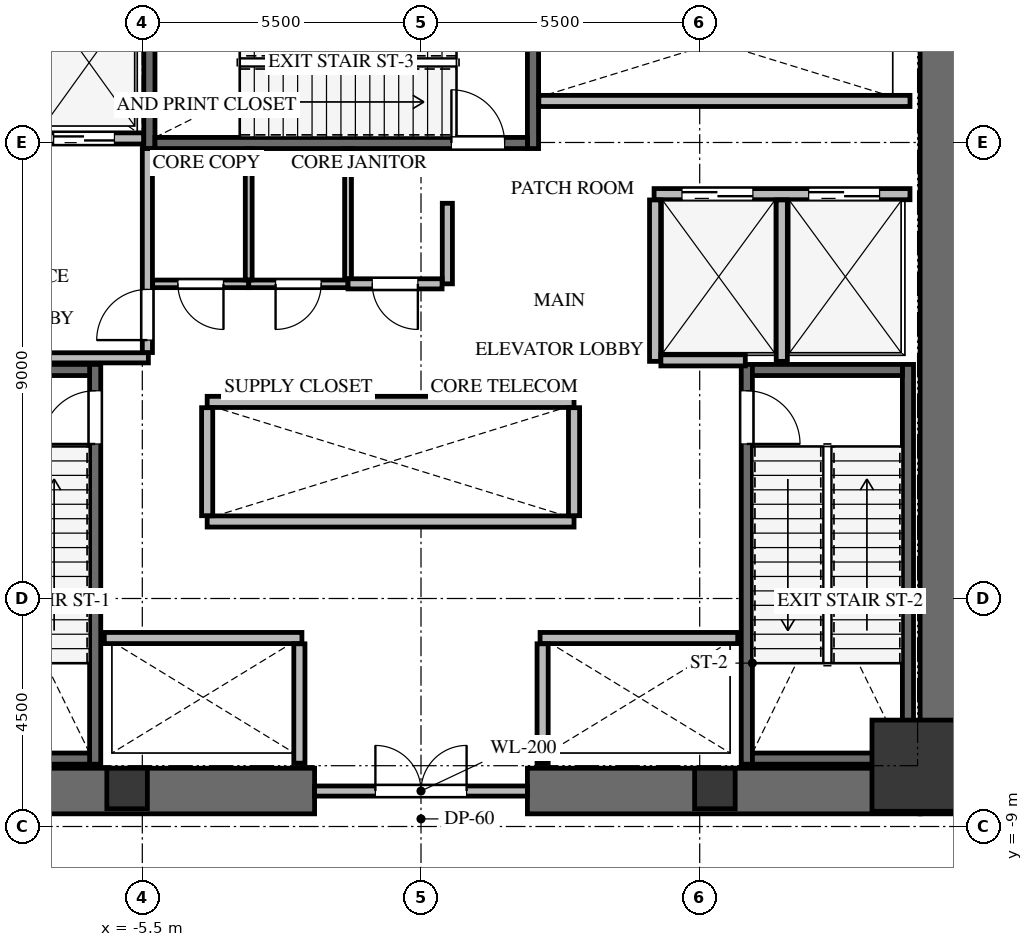
"""IFC4 building model, lengths in metres.
Left out: names, types, materials, properties, quantities, classifications, styles, units other than length and angle.
Written with IfcOpenShell. Run it as: python <this file> out.ifc"""

import sys

from ifc_helpers import new_model, si_unit, direction, frame, frame_2d, origin, origin_2d, place, context, subcontext, project, spatial, rectangle, extrude, source, transform, mapped, element, fill, save


model = new_model("IFC4")
c1 = context("Model", 3, precision=1e-05, world=origin(), true_north=direction((0.0, 1.0)))
c2 = subcontext(c1, "Body", "Model", "MODEL_VIEW")
j1 = project(units=[si_unit("LENGTHUNIT", "METRE"), si_unit("PLANEANGLEUNIT", "RADIAN")], contexts=[c1])
p1 = place(None, origin())
s1 = spatial("IfcSite", under=j1, at=p1, CompositionType="ELEMENT")
p2 = place(p1, origin())
s2 = spatial("IfcBuilding", under=s1, at=p2, CompositionType="ELEMENT")
p3 = place(p2, frame((0.0, 0.0, 21.2)))
s3 = spatial("IfcBuildingStorey", under=s2, at=p3, CompositionType="ELEMENT", Elevation=21.2)
p4 = place(p3, frame((10.3, -8.75, 0.0), z_axis=(0.0, 0.0, 1.0), x_axis=(0.0, 1.0, 0.0)))
e1 = element("IfcWall", 1, at=p4, inside=s3, PredefinedType="SHEAR", context=c2, shape_type="SweptSolid", body=[
    extrude(rectangle(XDim=17.5, YDim=0.9, at=frame_2d((8.75, 0.0))), origin(), (0.0, 0.0, 1.0), 5.6),
])
for number, where, z_axis, x_axis in (
    (2, (-9.85, -8.3, 0.0), (0.0, 0.0, 1.0), (1.0, 0.0, 0.0)),
    (3, (2.1, -8.3, 0.0), (0.0, 0.0, 1.0), (1.0, 0.0, 0.0)),
):
    element("IfcWall", number, at=place(p3, frame(where, z_axis=z_axis, x_axis=x_axis)), inside=s3, PredefinedType="SHEAR", context=c2, shape_type="SweptSolid", body=[
        extrude(rectangle(XDim=7.75, YDim=0.9, at=frame_2d((3.875, 0.0))), origin(), (0.0, 0.0, 1.0), 5.6),
    ])
p5 = place(p3, frame((-6.43, -7.77, -0.32), z_axis=(0.0, 0.0, 1.0), x_axis=(0.0, 1.0, 0.0)))
e4 = element("IfcWall", 4, at=p5, inside=s3, PredefinedType="SHEAR", context=c2, shape_type="SweptSolid", body=[
    extrude(rectangle(XDim=7.89, YDim=0.22, at=frame_2d((3.945, 0.0))), origin(), (0.0, 0.0, 1.0), 5.6),
])
p6 = place(p5, frame((6.32, 0.0, 0.0)))
e5 = element("IfcOpeningElement", 5, at=p6, cuts=e4, PredefinedType="OPENING", context=c2, shape_type="SweptSolid", body=[
    extrude(rectangle(XDim=1.05, YDim=2.15, at=frame_2d((0.525, 1.075))), frame((0.0, 0.12, 0.0), z_axis=(0.0, -1.0, 0.0), x_axis=(1.0, 0.0, 0.0)), (0.0, 0.0, 1.0), 0.24),
])
for number, where, z_axis, x_axis in (
    (6, (-9.5, -7.66, -0.32), (0.0, 0.0, 1.0), (1.0, 0.0, 0.0)),
    (7, (-6.54, 0.01, -0.32), (0.0, 0.0, 1.0), (-1.0, 0.0, 0.0)),
):
    element("IfcWall", number, at=place(p3, frame(where, z_axis=z_axis, x_axis=x_axis)), inside=s3, PredefinedType="SHEAR", context=c2, shape_type="SweptSolid", body=[
        extrude(rectangle(XDim=2.96, YDim=0.22, at=frame_2d((1.48, 0.0))), origin(), (0.0, 0.0, 1.0), 5.6),
    ])
p7 = place(p3, frame((9.61, -7.77, -0.32), z_axis=(0.0, 0.0, 1.0), x_axis=(0.0, 1.0, 0.0)))
e8 = element("IfcWall", 8, at=p7, inside=s3, PredefinedType="SHEAR", context=c2, shape_type="SweptSolid", body=[
    extrude(rectangle(XDim=7.89, YDim=0.22, at=frame_2d((3.945, 0.0))), origin(), (0.0, 0.0, 1.0), 5.6),
])
p8 = place(p3, frame((6.43, 0.12, -0.32), z_axis=(0.0, 0.0, 1.0), x_axis=(0.0, -1.0, 0.0)))
e9 = element("IfcWall", 9, at=p8, inside=s3, PredefinedType="SHEAR", context=c2, shape_type="SweptSolid", body=[
    extrude(rectangle(XDim=7.89, YDim=0.22, at=frame_2d((3.945, 0.0))), origin(), (0.0, 0.0, 1.0), 5.6),
])
p9 = place(p8, frame((0.52, 0.0, 0.0)))
e10 = element("IfcOpeningElement", 10, at=p9, cuts=e9, PredefinedType="OPENING", context=c2, shape_type="SweptSolid", body=[
    extrude(rectangle(XDim=1.05, YDim=2.15, at=frame_2d((0.525, 1.075))), frame((0.0, 0.12, 0.0), z_axis=(0.0, -1.0, 0.0), x_axis=(1.0, 0.0, 0.0)), (0.0, 0.0, 1.0), 0.24),
])
for number, where, z_axis, x_axis in (
    (11, (6.54, -7.66, -0.32), (0.0, 0.0, 1.0), (1.0, 0.0, 0.0)),
    (12, (9.5, 0.01, -0.32), (0.0, 0.0, 1.0), (-1.0, 0.0, 0.0)),
):
    element("IfcWall", number, at=place(p3, frame(where, z_axis=z_axis, x_axis=x_axis)), inside=s3, PredefinedType="SHEAR", context=c2, shape_type="SweptSolid", body=[
        extrude(rectangle(XDim=2.96, YDim=0.22, at=frame_2d((1.48, 0.0))), origin(), (0.0, 0.0, 1.0), 5.6),
    ])
for number, where, z_axis, x_axis in (
    (13, (2.21, 4.38, -0.32), (0.0, 0.0, 1.0), (0.0, 1.0, 0.0)),
    (14, (-5.36, 7.78, -0.32), (0.0, 0.0, 1.0), (0.0, -1.0, 0.0)),
):
    element("IfcWall", number, at=place(p3, frame(where, z_axis=z_axis, x_axis=x_axis)), inside=s3, PredefinedType="SHEAR", context=c2, shape_type="SweptSolid", body=[
        extrude(rectangle(XDim=3.4, YDim=0.22, at=frame_2d((1.7, 0.0))), origin(), (0.0, 0.0, 1.0), 5.6),
    ])
p10 = place(p3, frame((-5.25, 4.49, -0.32), z_axis=(0.0, 0.0, 1.0), x_axis=(1.0, 0.0, 0.0)))
e15 = element("IfcWall", 15, at=p10, inside=s3, PredefinedType="SHEAR", context=c2, shape_type="SweptSolid", body=[
    extrude(rectangle(XDim=7.35, YDim=0.22, at=frame_2d((3.675, 0.0))), origin(), (0.0, 0.0, 1.0), 5.6),
])
p11 = place(p10, frame((5.85, 0.0, 0.0)))
e16 = element("IfcOpeningElement", 16, at=p11, cuts=e15, PredefinedType="OPENING", context=c2, shape_type="SweptSolid", body=[
    extrude(rectangle(XDim=1.05, YDim=2.15, at=frame_2d((0.525, 1.075))), frame((0.0, 0.12, 0.0), z_axis=(0.0, -1.0, 0.0), x_axis=(1.0, 0.0, 0.0)), (0.0, 0.0, 1.0), 0.24),
])
m1 = source(origin(), c2, "Body", "SweptSolid", [
    extrude(rectangle(XDim=1.8, YDim=1.8, at=origin_2d()), origin(), (0.0, 0.0, 1.0), 5.6),
])
p12 = place(p3, frame((9.8, -7.8, -0.32), z_axis=(0.0, 0.0, 1.0), x_axis=(1.0, 0.0, 0.0)))
e17 = element("IfcColumn", 17, at=p12, inside=s3, PredefinedType="COLUMN", context=c2, shape_type="MappedRepresentation", body=[
    mapped(m1, transform((0.0, 0.0, 0.0), x_axis=(1.0, 0.0, 0.0), y_axis=(0.0, 1.0, 0.0), z_axis=(0.0, 0.0, 1.0), scale=1.0)),
])
m2 = source(origin(), c2, "Body", "SweptSolid", [
    extrude(rectangle(XDim=0.8, YDim=0.8, at=origin_2d()), origin(), (0.0, 0.0, 1.0), 5.6),
])
for number, where, z_axis, x_axis in (
    (18, (-5.8, -8.25, -0.32), (0.0, 0.0, 1.0), (1.0, 0.0, 0.0)),
    (19, (5.8, -8.25, -0.32), (0.0, 0.0, 1.0), (1.0, 0.0, 0.0)),
):
    element("IfcColumn", number, at=place(p3, frame(where, z_axis=z_axis, x_axis=x_axis)), inside=s3, PredefinedType="PILASTER", context=c2, shape_type="MappedRepresentation", body=[
        mapped(m2, transform((0.0, 0.0, 0.0), x_axis=(1.0, 0.0, 0.0), y_axis=(0.0, 1.0, 0.0), z_axis=(0.0, 0.0, 1.0), scale=1.0)),
    ])
p13 = place(p3, frame((-2.1, -8.3, 0.0), z_axis=(0.0, 0.0, 1.0), x_axis=(1.0, 0.0, 0.0)))
e20 = element("IfcWall", 20, at=p13, inside=s3, PredefinedType="SOLIDWALL", context=c2, shape_type="SweptSolid", body=[
    extrude(rectangle(XDim=4.2, YDim=0.2, at=frame_2d((2.1, 0.0))), origin(), (0.0, 0.0, 1.0), 5.265),
])
p14 = place(p13, frame((1.2, 0.0, 0.0)))
e21 = element("IfcOpeningElement", 21, at=p14, cuts=e20, PredefinedType="OPENING", context=c2, shape_type="SweptSolid", body=[
    extrude(rectangle(XDim=1.8, YDim=2.15, at=frame_2d((0.9, 1.075))), frame((0.0, 0.11, 0.0), z_axis=(0.0, -1.0, 0.0), x_axis=(1.0, 0.0, 0.0)), (0.0, 0.0, 1.0), 0.22),
])
p15 = place(p3, frame((-9.65, 4.58, 0.0), z_axis=(0.0, 0.0, 1.0), x_axis=(1.0, 0.0, 0.0)))
e22 = element("IfcWall", 22, at=p15, inside=s3, PredefinedType="SOLIDWALL", context=c2, shape_type="SweptSolid", body=[
    extrude(rectangle(XDim=4.175, YDim=0.22, at=frame_2d((2.087, 0.0))), origin(), (0.0, 0.0, 1.0), 5.265),
])
p16 = place(p15, frame((0.4, 0.0, 0.0)))
e23 = element("IfcOpeningElement", 23, at=p16, cuts=e22, PredefinedType="OPENING", context=c2, shape_type="SweptSolid", body=[
    extrude(rectangle(XDim=1.2, YDim=2.15, at=frame_2d((0.6, 1.075))), frame((0.0, 0.12, 0.0), z_axis=(0.0, -1.0, 0.0), x_axis=(1.0, 0.0, 0.0)), (0.0, 0.0, 1.0), 0.24),
])
p17 = place(p15, frame((2.4, 0.0, 0.0)))
e24 = element("IfcOpeningElement", 24, at=p17, cuts=e22, PredefinedType="OPENING", context=c2, shape_type="SweptSolid", body=[
    extrude(rectangle(XDim=1.2, YDim=2.15, at=frame_2d((0.6, 1.075))), frame((0.0, 0.12, 0.0), z_axis=(0.0, -1.0, 0.0), x_axis=(1.0, 0.0, 0.0)), (0.0, 0.0, 1.0), 0.24),
])
p18 = place(p3, frame((-9.65, 0.25, 0.0), z_axis=(0.0, 0.0, 1.0), x_axis=(1.0, 0.0, 0.0)))
e25 = element("IfcWall", 25, at=p18, inside=s3, PredefinedType="SOLIDWALL", context=c2, shape_type="SweptSolid", body=[
    extrude(rectangle(XDim=4.27, YDim=0.2, at=frame_2d((2.135, 0.0))), origin(), (0.0, 0.0, 1.0), 5.265),
])
p19 = place(p3, frame((-5.4, 0.354, 0.0), z_axis=(0.0, 0.0, 1.0), x_axis=(0.0, 1.0, 0.0)))
e26 = element("IfcWall", 26, at=p19, inside=s3, PredefinedType="SOLIDWALL", context=c2, shape_type="SweptSolid", body=[
    extrude(rectangle(XDim=4.026, YDim=0.2, at=frame_2d((2.013, 0.0))), origin(), (0.0, 0.0, 1.0), 5.265),
])
p20 = place(p19, frame((0.246, 0.0, 0.0)))
e27 = element("IfcOpeningElement", 27, at=p20, cuts=e26, PredefinedType="OPENING", context=c2, shape_type="SweptSolid", body=[
    extrude(rectangle(XDim=1.0, YDim=2.15, at=frame_2d((0.5, 1.075))), frame((0.0, 0.11, 0.0), z_axis=(0.0, -1.0, 0.0), x_axis=(1.0, 0.0, 0.0)), (0.0, 0.0, 1.0), 0.22),
])
p21 = place(p3, frame((4.6, 3.48, 0.0), z_axis=(0.0, 0.0, 1.0), x_axis=(1.0, 0.0, 0.0)))
e28 = element("IfcWall", 28, at=p21, inside=s3, PredefinedType="SOLIDWALL", context=c2, shape_type="SweptSolid", body=[
    extrude(rectangle(XDim=5.05, YDim=0.22, at=frame_2d((2.525, 0.0))), origin(), (0.0, 0.0, 1.0), 5.265),
])
p22 = place(p21, frame((0.55, 0.0, 0.0)))
e29 = element("IfcOpeningElement", 29, at=p22, cuts=e28, PredefinedType="OPENING", context=c2, shape_type="SweptSolid", body=[
    extrude(rectangle(XDim=1.4, YDim=2.15, at=frame_2d((0.7, 1.075))), frame((0.0, 0.12, 0.0), z_axis=(0.0, -1.0, 0.0), x_axis=(1.0, 0.0, 0.0)), (0.0, 0.0, 1.0), 0.24),
])
p23 = place(p21, frame((3.05, 0.0, 0.0)))
e30 = element("IfcOpeningElement", 30, at=p23, cuts=e28, PredefinedType="OPENING", context=c2, shape_type="SweptSolid", body=[
    extrude(rectangle(XDim=1.4, YDim=2.15, at=frame_2d((0.7, 1.075))), frame((0.0, 0.12, 0.0), z_axis=(0.0, -1.0, 0.0), x_axis=(1.0, 0.0, 0.0)), (0.0, 0.0, 1.0), 0.24),
])
for number, where, z_axis, x_axis in (
    (31, (4.62, 0.18, 0.0), (0.0, 0.0, 1.0), (0.0, 1.0, 0.0)),
    (32, (7.12, 0.18, 0.0), (0.0, 0.0, 1.0), (0.0, 1.0, 0.0)),
):
    element("IfcWall", number, at=place(p3, frame(where, z_axis=z_axis, x_axis=x_axis)), inside=s3, PredefinedType="SOLIDWALL", context=c2, shape_type="SweptSolid", body=[
        extrude(rectangle(XDim=3.186, YDim=0.22, at=frame_2d((1.593, 0.0))), origin(), (0.0, 0.0, 1.0), 5.265),
    ])
p24 = place(p3, frame((4.734, 0.2, 0.0), z_axis=(0.0, 0.0, 1.0), x_axis=(1.0, 0.0, 0.0)))
e33 = element("IfcWall", 33, at=p24, inside=s3, PredefinedType="SOLIDWALL", context=c2, shape_type="SweptSolid", body=[
    extrude(rectangle(XDim=1.666, YDim=0.22, at=frame_2d((0.833, 0.0))), origin(), (0.0, 0.0, 1.0), 5.265),
])
for number, where, z_axis, x_axis in (
    (34, (-6.25, -5.28, 0.0), (0.0, 0.0, 1.0), (1.0, 0.0, 0.0)),
    (35, (2.35, -5.28, 0.0), (0.0, 0.0, 1.0), (1.0, 0.0, 0.0)),
):
    element("IfcWall", number, at=place(p3, frame(where, z_axis=z_axis, x_axis=x_axis)), inside=s3, PredefinedType="SOLIDWALL", context=c2, shape_type="SweptSolid", body=[
        extrude(rectangle(XDim=3.9, YDim=0.22, at=frame_2d((1.95, 0.0))), origin(), (0.0, 0.0, 1.0), 5.265),
    ])
for number, where, z_axis, x_axis in (
    (36, (-2.4, -7.75, 0.0), (0.0, 0.0, 1.0), (0.0, 1.0, 0.0)),
    (37, (2.4, -7.75, 0.0), (0.0, 0.0, 1.0), (0.0, 1.0, 0.0)),
):
    element("IfcWall", number, at=place(p3, frame(where, z_axis=z_axis, x_axis=x_axis)), inside=s3, PredefinedType="SOLIDWALL", context=c2, shape_type="SweptSolid", body=[
        extrude(rectangle(XDim=2.356, YDim=0.22, at=frame_2d((1.178, 0.0))), origin(), (0.0, 0.0, 1.0), 5.265),
    ])
for number, where, z_axis, x_axis in (
    (38, (-4.22, -2.98, 0.0), (0.0, 0.0, 1.0), (1.0, 0.0, 0.0)),
    (39, (-4.22, -0.62, 0.0), (0.0, 0.0, 1.0), (1.0, 0.0, 0.0)),
):
    element("IfcWall", number, at=place(p3, frame(where, z_axis=z_axis, x_axis=x_axis)), inside=s3, PredefinedType="SOLIDWALL", context=c2, shape_type="SweptSolid", body=[
        extrude(rectangle(XDim=7.24, YDim=0.22, at=frame_2d((3.62, 0.0))), origin(), (0.0, 0.0, 1.0), 5.265),
    ])
for number, where, z_axis, x_axis in (
    (40, (-4.22, -2.866, 0.0), (0.0, 0.0, 1.0), (0.0, 1.0, 0.0)),
    (41, (3.02, -2.866, 0.0), (0.0, 0.0, 1.0), (0.0, 1.0, 0.0)),
):
    element("IfcWall", number, at=place(p3, frame(where, z_axis=z_axis, x_axis=x_axis)), inside=s3, PredefinedType="SOLIDWALL", context=c2, shape_type="SweptSolid", body=[
        extrude(rectangle(XDim=2.132, YDim=0.22, at=frame_2d((1.066, 0.0))), origin(), (0.0, 0.0, 1.0), 5.265),
    ])
p25 = place(p3, frame((2.325, 5.32, 0.0), z_axis=(0.0, 0.0, 1.0), x_axis=(1.0, 0.0, 0.0)))
e42 = element("IfcWall", 42, at=p25, inside=s3, PredefinedType="SOLIDWALL", context=c2, shape_type="SweptSolid", body=[
    extrude(rectangle(XDim=7.325, YDim=0.22, at=frame_2d((3.663, 0.0))), origin(), (0.0, 0.0, 1.0), 5.265),
])
p26 = place(p3, frame((-3.4, 1.71, 0.0), z_axis=(0.0, 0.0, 1.0), x_axis=(-1.0, 0.0, 0.0)))
e43 = element("IfcWall", 43, at=p26, inside=s3, PredefinedType="PARTITIONING", context=c2, shape_type="SweptSolid", body=[
    extrude(rectangle(XDim=1.896, YDim=0.15, at=frame_2d((0.948, 0.0))), origin(), (0.0, 0.0, 1.0), 5.265),
])
p27 = place(p26, frame((0.498, 0.0, 0.0)))
e44 = element("IfcOpeningElement", 44, at=p27, cuts=e43, PredefinedType="OPENING", context=c2, shape_type="SweptSolid", body=[
    extrude(rectangle(XDim=0.9, YDim=2.05, at=frame_2d((0.45, 1.025))), frame((0.0, 0.085, 0.0), z_axis=(0.0, -1.0, 0.0), x_axis=(1.0, 0.0, 0.0)), (0.0, 0.0, 1.0), 0.17),
])
p28 = place(p3, frame((-1.44, 1.71, 0.0), z_axis=(0.0, 0.0, 1.0), x_axis=(-1.0, 0.0, 0.0)))
e45 = element("IfcWall", 45, at=p28, inside=s3, PredefinedType="PARTITIONING", context=c2, shape_type="SweptSolid", body=[
    extrude(rectangle(XDim=1.96, YDim=0.15, at=frame_2d((0.98, 0.0))), origin(), (0.0, 0.0, 1.0), 5.265),
])
p29 = place(p28, frame((0.53, 0.0, 0.0)))
e46 = element("IfcOpeningElement", 46, at=p29, cuts=e45, PredefinedType="OPENING", context=c2, shape_type="SweptSolid", body=[
    extrude(rectangle(XDim=0.9, YDim=2.05, at=frame_2d((0.45, 1.025))), frame((0.0, 0.085, 0.0), z_axis=(0.0, -1.0, 0.0), x_axis=(1.0, 0.0, 0.0)), (0.0, 0.0, 1.0), 0.17),
])
p30 = place(p3, frame((0.52, 3.3, 0.0), z_axis=(0.0, 0.0, 1.0), x_axis=(0.0, -1.0, 0.0)))
e47 = element("IfcWall", 47, at=p30, inside=s3, PredefinedType="SOLIDWALL", context=c2, shape_type="SweptSolid", body=[
    extrude(rectangle(XDim=1.59, YDim=0.2, at=frame_2d((0.795, 0.0))), origin(), (0.0, 0.0, 1.0), 5.265),
])
p31 = place(p3, frame((0.416, 1.71, 0.0), z_axis=(0.0, 0.0, 1.0), x_axis=(-1.0, 0.0, 0.0)))
e48 = element("IfcWall", 48, at=p31, inside=s3, PredefinedType="SOLIDWALL", context=c2, shape_type="SweptSolid", body=[
    extrude(rectangle(XDim=1.856, YDim=0.2, at=frame_2d((0.928, 0.0))), origin(), (0.0, 0.0, 1.0), 5.265),
])
p32 = place(p31, frame((0.478, 0.0, 0.0)))
e49 = element("IfcOpeningElement", 49, at=p32, cuts=e48, PredefinedType="OPENING", context=c2, shape_type="SweptSolid", body=[
    extrude(rectangle(XDim=0.9, YDim=2.05, at=frame_2d((0.45, 1.025))), frame((0.0, 0.11, 0.0), z_axis=(0.0, -1.0, 0.0), x_axis=(1.0, 0.0, 0.0)), (0.0, 0.0, 1.0), 0.22),
])
p33 = place(p3, frame((-3.4, 4.375, 0.0), z_axis=(0.0, 0.0, 1.0), x_axis=(0.0, -1.0, 0.0)))
e50 = element("IfcWall", 50, at=p33, inside=s3, PredefinedType="PARTITIONING", context=c2, shape_type="SweptSolid", body=[
    extrude(rectangle(XDim=2.586, YDim=0.135, at=frame_2d((1.293, 0.0))), origin(), (0.0, 0.0, 1.0), 5.265),
])
p34 = place(p3, frame((-1.44, 4.375, 0.0), z_axis=(0.0, 0.0, 1.0), x_axis=(0.0, -1.0, 0.0)))
e51 = element("IfcWall", 51, at=p34, inside=s3, PredefinedType="PARTITIONING", context=c2, shape_type="SweptSolid", body=[
    extrude(rectangle(XDim=2.561, YDim=0.135, at=frame_2d((1.281, 0.0))), origin(), (0.0, 0.0, 1.0), 5.265),
])
m3 = source(origin(), c2, "Body", "SweptSolid", [
    extrude(rectangle(XDim=1.05, YDim=2.15, at=frame_2d((0.525, 1.075))), frame((0.0, 0.025, 0.0), z_axis=(0.0, -1.0, 0.0), x_axis=(1.0, 0.0, 0.0)), (0.0, 0.0, 1.0), 0.05),
])
p35 = place(p6, origin())
e52 = element("IfcDoor", 52, at=p35, inside=s3, OperationType="SINGLE_SWING_LEFT", PredefinedType="DOOR", context=c2, shape_type="MappedRepresentation", body=[
    mapped(m3, transform((0.0, 0.0, 0.0), x_axis=(1.0, 0.0, 0.0), y_axis=(0.0, 1.0, 0.0), z_axis=(0.0, 0.0, 1.0), scale=1.0)),
])
fill(e5, e52)
m4 = source(origin(), c2, "Body", "SweptSolid", [
    extrude(rectangle(XDim=1.05, YDim=2.15, at=frame_2d((0.525, 1.075))), frame((0.0, 0.025, 0.0), z_axis=(0.0, -1.0, 0.0), x_axis=(1.0, 0.0, 0.0)), (0.0, 0.0, 1.0), 0.05),
])
p36 = place(p9, origin())
e53 = element("IfcDoor", 53, at=p36, inside=s3, OperationType="SINGLE_SWING_RIGHT", PredefinedType="DOOR", context=c2, shape_type="MappedRepresentation", body=[
    mapped(m4, transform((0.0, 0.0, 0.0), x_axis=(1.0, 0.0, 0.0), y_axis=(0.0, 1.0, 0.0), z_axis=(0.0, 0.0, 1.0), scale=1.0)),
])
fill(e10, e53)
p37 = place(p11, origin())
e54 = element("IfcDoor", 54, at=p37, inside=s3, OperationType="SINGLE_SWING_LEFT", PredefinedType="DOOR", context=c2, shape_type="MappedRepresentation", body=[
    mapped(m3, transform((0.0, 0.0, 0.0), x_axis=(1.0, 0.0, 0.0), y_axis=(0.0, 1.0, 0.0), z_axis=(0.0, 0.0, 1.0), scale=1.0)),
])
fill(e16, e54)
m5 = source(origin(), c2, "Body", "SweptSolid", [
    extrude(rectangle(XDim=1.8, YDim=2.15, at=frame_2d((0.9, 1.075))), frame((0.0, 0.025, 0.0), z_axis=(0.0, -1.0, 0.0), x_axis=(1.0, 0.0, 0.0)), (0.0, 0.0, 1.0), 0.05),
])
p38 = place(p14, origin())
e55 = element("IfcDoor", 55, at=p38, inside=s3, OperationType="DOUBLE_DOOR_SINGLE_SWING", PredefinedType="DOOR", context=c2, shape_type="MappedRepresentation", body=[
    mapped(m5, transform((0.0, 0.0, 0.0), x_axis=(1.0, 0.0, 0.0), y_axis=(0.0, 1.0, 0.0), z_axis=(0.0, 0.0, 1.0), scale=1.0)),
])
fill(e21, e55)
m6 = source(origin(), c2, "Body", "SweptSolid", [
    extrude(rectangle(XDim=1.2, YDim=2.15, at=frame_2d((0.6, 1.075))), frame((0.0, 0.025, 0.0), z_axis=(0.0, -1.0, 0.0), x_axis=(1.0, 0.0, 0.0)), (0.0, 0.0, 1.0), 0.05),
])
p39 = place(p17, origin())
e56 = element("IfcDoor", 56, at=p39, inside=s3, OperationType="DOUBLE_DOOR_SLIDING", PredefinedType="DOOR", context=c2, shape_type="MappedRepresentation", body=[
    mapped(m6, transform((0.0, 0.0, 0.0), x_axis=(1.0, 0.0, 0.0), y_axis=(0.0, 1.0, 0.0), z_axis=(0.0, 0.0, 1.0), scale=1.0)),
])
fill(e24, e56)
m7 = source(origin(), c2, "Body", "SweptSolid", [
    extrude(rectangle(XDim=1.0, YDim=2.15, at=frame_2d((0.5, 1.075))), frame((0.0, 0.025, 0.0), z_axis=(0.0, -1.0, 0.0), x_axis=(1.0, 0.0, 0.0)), (0.0, 0.0, 1.0), 0.05),
])
p40 = place(p20, origin())
e57 = element("IfcDoor", 57, at=p40, inside=s3, OperationType="SINGLE_SWING_LEFT", PredefinedType="DOOR", context=c2, shape_type="MappedRepresentation", body=[
    mapped(m7, transform((0.0, 0.0, 0.0), x_axis=(1.0, 0.0, 0.0), y_axis=(0.0, 1.0, 0.0), z_axis=(0.0, 0.0, 1.0), scale=1.0)),
])
fill(e27, e57)
m8 = source(origin(), c2, "Body", "SweptSolid", [
    extrude(rectangle(XDim=1.4, YDim=2.15, at=frame_2d((0.7, 1.075))), frame((0.0, 0.025, 0.0), z_axis=(0.0, -1.0, 0.0), x_axis=(1.0, 0.0, 0.0)), (0.0, 0.0, 1.0), 0.05),
])
p41 = place(p22, origin())
e58 = element("IfcDoor", 58, at=p41, inside=s3, OperationType="DOUBLE_DOOR_SLIDING", PredefinedType="DOOR", context=c2, shape_type="MappedRepresentation", body=[
    mapped(m8, transform((0.0, 0.0, 0.0), x_axis=(1.0, 0.0, 0.0), y_axis=(0.0, 1.0, 0.0), z_axis=(0.0, 0.0, 1.0), scale=1.0)),
])
fill(e29, e58)
p42 = place(p23, origin())
e59 = element("IfcDoor", 59, at=p42, inside=s3, OperationType="DOUBLE_DOOR_SLIDING", PredefinedType="DOOR", context=c2, shape_type="MappedRepresentation", body=[
    mapped(m8, transform((0.0, 0.0, 0.0), x_axis=(1.0, 0.0, 0.0), y_axis=(0.0, 1.0, 0.0), z_axis=(0.0, 0.0, 1.0), scale=1.0)),
])
fill(e30, e59)
m9 = source(origin(), c2, "Body", "SweptSolid", [
    extrude(rectangle(XDim=0.9, YDim=2.05, at=frame_2d((0.45, 1.025))), frame((0.0, 0.025, 0.0), z_axis=(0.0, -1.0, 0.0), x_axis=(1.0, 0.0, 0.0)), (0.0, 0.0, 1.0), 0.05),
])
p43 = place(p27, origin())
e60 = element("IfcDoor", 60, at=p43, inside=s3, OperationType="SINGLE_SWING_LEFT", PredefinedType="DOOR", context=c2, shape_type="MappedRepresentation", body=[
    mapped(m9, transform((0.0, 0.0, 0.0), x_axis=(1.0, 0.0, 0.0), y_axis=(0.0, 1.0, 0.0), z_axis=(0.0, 0.0, 1.0), scale=1.0)),
])
fill(e44, e60)
m10 = source(origin(), c2, "Body", "SweptSolid", [
    extrude(rectangle(XDim=0.9, YDim=2.05, at=frame_2d((0.45, 1.025))), frame((0.0, 0.025, 0.0), z_axis=(0.0, -1.0, 0.0), x_axis=(1.0, 0.0, 0.0)), (0.0, 0.0, 1.0), 0.05),
])
p44 = place(p29, origin())
e61 = element("IfcDoor", 61, at=p44, inside=s3, OperationType="SINGLE_SWING_RIGHT", PredefinedType="DOOR", context=c2, shape_type="MappedRepresentation", body=[
    mapped(m10, transform((0.0, 0.0, 0.0), x_axis=(1.0, 0.0, 0.0), y_axis=(0.0, 1.0, 0.0), z_axis=(0.0, 0.0, 1.0), scale=1.0)),
])
fill(e46, e61)
p45 = place(p32, origin())
e62 = element("IfcDoor", 62, at=p45, inside=s3, OperationType="SINGLE_SWING_LEFT", PredefinedType="DOOR", context=c2, shape_type="MappedRepresentation", body=[
    mapped(m9, transform((0.0, 0.0, 0.0), x_axis=(1.0, 0.0, 0.0), y_axis=(0.0, 1.0, 0.0), z_axis=(0.0, 0.0, 1.0), scale=1.0)),
])
fill(e49, e62)
save(model, sys.argv[1])
